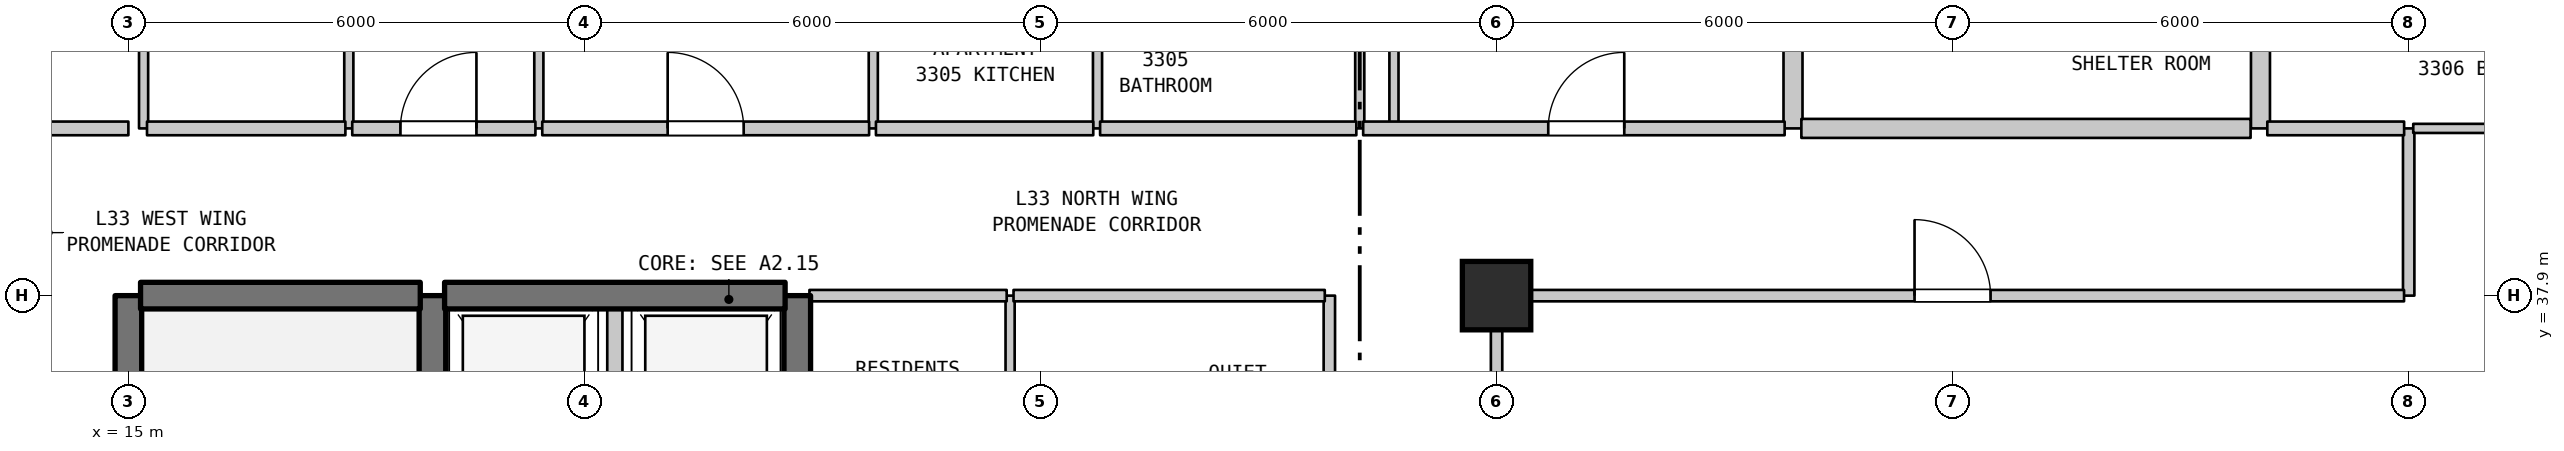
"""IFC4 building model, lengths in metres.
Left out: names, types, materials, properties, quantities, classifications, styles, units other than length and angle.
Written with IfcOpenShell. Run it as: python <this file> out.ifc"""

import sys

from ifc_helpers import new_model, si_unit, direction, frame, frame_2d, origin, origin_2d, place, context, subcontext, project, spatial, rectangle, extrude, element, fill, save


model = new_model("IFC4")
c1 = context("Model", 3, precision=1e-05, world=origin(), true_north=direction((0.0, 1.0)))
c2 = subcontext(c1, "Body", "Model", "MODEL_VIEW")
j1 = project(units=[si_unit("LENGTHUNIT", "METRE"), si_unit("PLANEANGLEUNIT", "RADIAN")], contexts=[c1])
p1 = place(None, origin())
s1 = spatial("IfcSite", under=j1, at=p1, CompositionType="ELEMENT")
p2 = place(p1, origin())
s2 = spatial("IfcBuilding", under=s1, at=p2, CompositionType="ELEMENT")
p3 = place(p2, frame((0.0, 0.0, 137.2)))
s3 = spatial("IfcBuildingStorey", under=s2, at=p3, CompositionType="ELEMENT", Elevation=137.2)
p4 = place(p3, frame((33.0, 37.9, 0.0), z_axis=(0.0, 0.0, 1.0), x_axis=(1.0, 0.0, 0.0)))
e1 = element("IfcColumn", 1, at=p4, inside=s3, PredefinedType="COLUMN", context=c2, shape_type="SweptSolid", body=[
    extrude(rectangle(XDim=0.9, YDim=0.9, at=origin_2d()), origin(), (0.0, 0.0, 1.0), 3.7),
])
p5 = place(p3, frame((15.0, 31.1, 0.0), z_axis=(0.0, 0.0, 1.0), x_axis=(0.0, 1.0, 0.0)))
e2 = element("IfcWall", 2, at=p5, inside=s3, PredefinedType="SHEAR", context=c2, shape_type="SweptSolid", body=[
    extrude(rectangle(XDim=6.8, YDim=0.35, at=frame_2d((3.4, 0.0))), origin(), (0.0, 0.0, 1.0), 3.385),
])
p6 = place(p3, frame((15.2, 40.1, 0.0), z_axis=(0.0, 0.0, 1.0), x_axis=(0.0, 1.0, 0.0)))
e3 = element("IfcWall", 3, at=p6, inside=s3, PredefinedType="PARTITIONING", context=c2, shape_type="SweptSolid", body=[
    extrude(rectangle(XDim=3.2, YDim=0.12, at=frame_2d((1.6, 0.0))), origin(), (0.0, 0.0, 1.0), 3.385),
])
p7 = place(p3, frame((17.9, 40.1, 0.0), z_axis=(0.0, 0.0, 1.0), x_axis=(0.0, 1.0, 0.0)))
e4 = element("IfcWall", 4, at=p7, inside=s3, PredefinedType="PARTITIONING", context=c2, shape_type="SweptSolid", body=[
    extrude(rectangle(XDim=3.2, YDim=0.12, at=frame_2d((1.6, 0.0))), origin(), (0.0, 0.0, 1.0), 3.385),
])
p8 = place(p7, frame((1.15, 0.0, 0.0)))
e5 = element("IfcOpeningElement", 5, at=p8, cuts=e4, PredefinedType="OPENING", context=c2, shape_type="SweptSolid", body=[
    extrude(rectangle(XDim=0.9, YDim=2.15, at=frame_2d((0.45, 1.075))), frame((0.0, 0.07, 0.0), z_axis=(0.0, -1.0, 0.0), x_axis=(1.0, 0.0, 0.0)), (0.0, 0.0, 1.0), 0.14),
])
p9 = place(p3, frame((19.0, 35.0, 0.0), z_axis=(0.0, 0.0, 1.0), x_axis=(0.0, 1.0, 0.0)))
e6 = element("IfcWall", 6, at=p9, inside=s3, PredefinedType="SHEAR", context=c2, shape_type="SweptSolid", body=[
    extrude(rectangle(XDim=2.9, YDim=0.35, at=frame_2d((1.45, 0.0))), origin(), (0.0, 0.0, 1.0), 3.385),
])
p10 = place(p3, frame((20.4, 40.1, 0.0), z_axis=(0.0, 0.0, 1.0), x_axis=(0.0, 1.0, 0.0)))
e7 = element("IfcWall", 7, at=p10, inside=s3, PredefinedType="PARTITIONING", context=c2, shape_type="SweptSolid", body=[
    extrude(rectangle(XDim=13.79, YDim=0.12, at=frame_2d((6.895, 0.0))), origin(), (0.0, 0.0, 1.0), 3.385),
])
p11 = place(p3, frame((21.4, 35.0, 0.0), z_axis=(0.0, 0.0, 1.0), x_axis=(0.0, 1.0, 0.0)))
e8 = element("IfcWall", 8, at=p11, inside=s3, PredefinedType="STANDARD", context=c2, shape_type="SweptSolid", body=[
    extrude(rectangle(XDim=2.9, YDim=0.2, at=frame_2d((1.45, 0.0))), origin(), (0.0, 0.0, 1.0), 3.385),
])
p12 = place(p3, frame((23.8, 35.0, 0.0), z_axis=(0.0, 0.0, 1.0), x_axis=(0.0, 1.0, 0.0)))
e9 = element("IfcWall", 9, at=p12, inside=s3, PredefinedType="SHEAR", context=c2, shape_type="SweptSolid", body=[
    extrude(rectangle(XDim=2.9, YDim=0.35, at=frame_2d((1.45, 0.0))), origin(), (0.0, 0.0, 1.0), 3.385),
])
p13 = place(p3, frame((24.8, 40.1, 0.0), z_axis=(0.0, 0.0, 1.0), x_axis=(0.0, 1.0, 0.0)))
e10 = element("IfcWall", 10, at=p13, inside=s3, PredefinedType="PARTITIONING", context=c2, shape_type="SweptSolid", body=[
    extrude(rectangle(XDim=2.3, YDim=0.12, at=frame_2d((1.15, 0.0))), origin(), (0.0, 0.0, 1.0), 3.385),
])
p14 = place(p3, frame((26.6, 35.0, 0.0), z_axis=(0.0, 0.0, 1.0), x_axis=(0.0, 1.0, 0.0)))
e11 = element("IfcWall", 11, at=p14, inside=s3, PredefinedType="PARTITIONING", context=c2, shape_type="SweptSolid", body=[
    extrude(rectangle(XDim=2.9, YDim=0.12, at=frame_2d((1.45, 0.0))), origin(), (0.0, 0.0, 1.0), 3.385),
])
p15 = place(p3, frame((27.75, 40.1, 0.0), z_axis=(0.0, 0.0, 1.0), x_axis=(0.0, 1.0, 0.0)))
e12 = element("IfcWall", 12, at=p15, inside=s3, PredefinedType="PARTITIONING", context=c2, shape_type="SweptSolid", body=[
    extrude(rectangle(XDim=2.3, YDim=0.12, at=frame_2d((1.15, 0.0))), origin(), (0.0, 0.0, 1.0), 3.385),
])
p16 = place(p3, frame((30.8, 35.0, 0.0), z_axis=(0.0, 0.0, 1.0), x_axis=(0.0, 1.0, 0.0)))
e13 = element("IfcWall", 13, at=p16, inside=s3, PredefinedType="STANDARD", context=c2, shape_type="SweptSolid", body=[
    extrude(rectangle(XDim=2.9, YDim=0.15, at=frame_2d((1.45, 0.0))), origin(), (0.0, 0.0, 1.0), 3.385),
])
p17 = place(p3, frame((31.2, 40.1, 0.0), z_axis=(0.0, 0.0, 1.0), x_axis=(0.0, 1.0, 0.0)))
e14 = element("IfcWall", 14, at=p17, inside=s3, PredefinedType="PARTITIONING", context=c2, shape_type="SweptSolid", body=[
    extrude(rectangle(XDim=2.3, YDim=0.12, at=frame_2d((1.15, 0.0))), origin(), (0.0, 0.0, 1.0), 3.385),
])
p18 = place(p3, frame((31.65, 40.1, 0.0), z_axis=(0.0, 0.0, 1.0), x_axis=(0.0, 1.0, 0.0)))
e15 = element("IfcWall", 15, at=p18, inside=s3, PredefinedType="PARTITIONING", context=c2, shape_type="SweptSolid", body=[
    extrude(rectangle(XDim=2.05, YDim=0.12, at=frame_2d((1.025, 0.0))), origin(), (0.0, 0.0, 1.0), 3.385),
])
p19 = place(p3, frame((33.0, 29.16, 0.0), z_axis=(0.0, 0.0, 1.0), x_axis=(0.0, 1.0, 0.0)))
e16 = element("IfcWall", 16, at=p19, inside=s3, PredefinedType="STANDARD", context=c2, shape_type="SweptSolid", body=[
    extrude(rectangle(XDim=8.74, YDim=0.15, at=frame_2d((4.37, 0.0))), origin(), (0.0, 0.0, 1.0), 2.885),
])
p20 = place(p19, frame((3.799, 0.0, 0.0)))
e17 = element("IfcOpeningElement", 17, at=p20, cuts=e16, PredefinedType="OPENING", context=c2, shape_type="SweptSolid", body=[
    extrude(rectangle(XDim=1.0, YDim=2.15, at=frame_2d((0.5, 1.075))), frame((0.0, 0.085, 0.0), z_axis=(0.0, -1.0, 0.0), x_axis=(1.0, 0.0, 0.0)), (0.0, 0.0, 1.0), 0.17),
])
for number, where, z_axis, x_axis in (
    (18, (36.9, 40.1, 0.0), (0.0, 0.0, 1.0), (0.0, 1.0, 0.0)),
    (19, (43.05, 40.1, 0.0), (0.0, 0.0, 1.0), (0.0, 1.0, 0.0)),
):
    element("IfcWall", number, at=place(p3, frame(where, z_axis=z_axis, x_axis=x_axis)), inside=s3, PredefinedType="STANDARD", context=c2, shape_type="SweptSolid", body=[
        extrude(rectangle(XDim=2.3, YDim=0.25, at=frame_2d((1.15, 0.0))), origin(), (0.0, 0.0, 1.0), 3.385),
    ])
p21 = place(p3, frame((45.0, 37.9, 0.0), z_axis=(0.0, 0.0, 1.0), x_axis=(0.0, 1.0, 0.0)))
e20 = element("IfcWall", 20, at=p21, inside=s3, PredefinedType="STANDARD", context=c2, shape_type="SweptSolid", body=[
    extrude(rectangle(XDim=2.2, YDim=0.15, at=frame_2d((1.1, 0.0))), origin(), (0.0, 0.0, 1.0), 3.385),
])
p22 = place(p3, frame((15.16, 37.9, 0.0), z_axis=(0.0, 0.0, 1.0), x_axis=(1.0, 0.0, 0.0)))
e21 = element("IfcWall", 21, at=p22, inside=s3, PredefinedType="SHEAR", context=c2, shape_type="SweptSolid", body=[
    extrude(rectangle(XDim=3.68, YDim=0.35, at=frame_2d((1.84, 0.0))), origin(), (0.0, 0.0, 1.0), 3.385),
])
p23 = place(p3, frame((19.16, 37.9, 0.0), z_axis=(0.0, 0.0, 1.0), x_axis=(1.0, 0.0, 0.0)))
e22 = element("IfcWall", 22, at=p23, inside=s3, PredefinedType="SHEAR", context=c2, shape_type="SweptSolid", body=[
    extrude(rectangle(XDim=4.48, YDim=0.35, at=frame_2d((2.24, 0.0))), origin(), (0.0, 0.0, 1.0), 3.385),
])
p24 = place(p3, frame((23.96, 37.9, 0.0), z_axis=(0.0, 0.0, 1.0), x_axis=(1.0, 0.0, 0.0)))
e23 = element("IfcWall", 23, at=p24, inside=s3, PredefinedType="STANDARD", context=c2, shape_type="SweptSolid", body=[
    extrude(rectangle(XDim=2.595, YDim=0.15, at=frame_2d((1.297, 0.0))), origin(), (0.0, 0.0, 1.0), 2.885),
])
p25 = place(p3, frame((26.645, 37.9, 0.0), z_axis=(0.0, 0.0, 1.0), x_axis=(1.0, 0.0, 0.0)))
e24 = element("IfcWall", 24, at=p25, inside=s3, PredefinedType="STANDARD", context=c2, shape_type="SweptSolid", body=[
    extrude(rectangle(XDim=4.095, YDim=0.15, at=frame_2d((2.047, 0.0))), origin(), (0.0, 0.0, 1.0), 2.885),
])
p26 = place(p3, frame((33.06, 37.9, 0.0), z_axis=(0.0, 0.0, 1.0), x_axis=(1.0, 0.0, 0.0)))
e25 = element("IfcWall", 25, at=p26, inside=s3, PredefinedType="STANDARD", context=c2, shape_type="SweptSolid", body=[
    extrude(rectangle(XDim=11.879, YDim=0.15, at=frame_2d((5.939, 0.0))), origin(), (0.0, 0.0, 1.0), 3.385),
])
p27 = place(p26, frame((5.439, 0.0, 0.0)))
e26 = element("IfcOpeningElement", 26, at=p27, cuts=e25, PredefinedType="OPENING", context=c2, shape_type="SweptSolid", body=[
    extrude(rectangle(XDim=1.0, YDim=2.15, at=frame_2d((0.5, 1.075))), frame((0.0, 0.085, 0.0), z_axis=(0.0, -1.0, 0.0), x_axis=(1.0, 0.0, 0.0)), (0.0, 0.0, 1.0), 0.17),
])
p28 = place(p3, frame((12.875, 40.1, 0.0), z_axis=(0.0, 0.0, 1.0), x_axis=(1.0, 0.0, 0.0)))
e27 = element("IfcWall", 27, at=p28, inside=s3, PredefinedType="STANDARD", context=c2, shape_type="SweptSolid", body=[
    extrude(rectangle(XDim=2.125, YDim=0.18, at=frame_2d((1.062, 0.0))), origin(), (0.0, 0.0, 1.0), 3.385),
])
p29 = place(p3, frame((15.245, 40.1, 0.0), z_axis=(0.0, 0.0, 1.0), x_axis=(1.0, 0.0, 0.0)))
e28 = element("IfcWall", 28, at=p29, inside=s3, PredefinedType="STANDARD", context=c2, shape_type="SweptSolid", body=[
    extrude(rectangle(XDim=2.61, YDim=0.18, at=frame_2d((1.305, 0.0))), origin(), (0.0, 0.0, 1.0), 3.385),
])
p30 = place(p3, frame((17.945, 40.1, 0.0), z_axis=(0.0, 0.0, 1.0), x_axis=(1.0, 0.0, 0.0)))
e29 = element("IfcWall", 29, at=p30, inside=s3, PredefinedType="STANDARD", context=c2, shape_type="SweptSolid", body=[
    extrude(rectangle(XDim=2.41, YDim=0.18, at=frame_2d((1.205, 0.0))), origin(), (0.0, 0.0, 1.0), 3.385),
])
p31 = place(p30, frame((0.634, 0.0, 0.0)))
e30 = element("IfcOpeningElement", 30, at=p31, cuts=e29, PredefinedType="OPENING", context=c2, shape_type="SweptSolid", body=[
    extrude(rectangle(XDim=1.0, YDim=2.15, at=frame_2d((0.5, 1.075))), frame((0.0, 0.1, 0.0), z_axis=(0.0, -1.0, 0.0), x_axis=(1.0, 0.0, 0.0)), (0.0, 0.0, 1.0), 0.2),
])
p32 = place(p3, frame((20.445, 40.1, 0.0), z_axis=(0.0, 0.0, 1.0), x_axis=(1.0, 0.0, 0.0)))
e31 = element("IfcWall", 31, at=p32, inside=s3, PredefinedType="STANDARD", context=c2, shape_type="SweptSolid", body=[
    extrude(rectangle(XDim=4.3, YDim=0.18, at=frame_2d((2.15, 0.0))), origin(), (0.0, 0.0, 1.0), 3.385),
])
p33 = place(p32, frame((1.65, 0.0, 0.0)))
e32 = element("IfcOpeningElement", 32, at=p33, cuts=e31, PredefinedType="OPENING", context=c2, shape_type="SweptSolid", body=[
    extrude(rectangle(XDim=1.0, YDim=2.15, at=frame_2d((0.5, 1.075))), frame((0.0, 0.1, 0.0), z_axis=(0.0, -1.0, 0.0), x_axis=(1.0, 0.0, 0.0)), (0.0, 0.0, 1.0), 0.2),
])
p34 = place(p3, frame((24.835, 40.1, 0.0), z_axis=(0.0, 0.0, 1.0), x_axis=(1.0, 0.0, 0.0)))
e33 = element("IfcWall", 33, at=p34, inside=s3, PredefinedType="STANDARD", context=c2, shape_type="SweptSolid", body=[
    extrude(rectangle(XDim=2.859, YDim=0.18, at=frame_2d((1.43, 0.0))), origin(), (0.0, 0.0, 1.0), 3.385),
])
p35 = place(p3, frame((27.784, 40.1, 0.0), z_axis=(0.0, 0.0, 1.0), x_axis=(1.0, 0.0, 0.0)))
e34 = element("IfcWall", 34, at=p35, inside=s3, PredefinedType="STANDARD", context=c2, shape_type="SweptSolid", body=[
    extrude(rectangle(XDim=3.371, YDim=0.18, at=frame_2d((1.686, 0.0))), origin(), (0.0, 0.0, 1.0), 3.385),
])
p36 = place(p3, frame((31.245, 40.1, 0.0), z_axis=(0.0, 0.0, 1.0), x_axis=(1.0, 0.0, 0.0)))
e35 = element("IfcWall", 35, at=p36, inside=s3, PredefinedType="STANDARD", context=c2, shape_type="SweptSolid", body=[
    extrude(rectangle(XDim=5.545, YDim=0.18, at=frame_2d((2.772, 0.0))), origin(), (0.0, 0.0, 1.0), 3.385),
])
p37 = place(p36, frame((2.435, 0.0, 0.0)))
e36 = element("IfcOpeningElement", 36, at=p37, cuts=e35, PredefinedType="OPENING", context=c2, shape_type="SweptSolid", body=[
    extrude(rectangle(XDim=1.0, YDim=2.15, at=frame_2d((0.5, 1.075))), frame((0.0, 0.1, 0.0), z_axis=(0.0, -1.0, 0.0), x_axis=(1.0, 0.0, 0.0)), (0.0, 0.0, 1.0), 0.2),
])
p38 = place(p3, frame((37.01, 40.1, 0.0), z_axis=(0.0, 0.0, 1.0), x_axis=(1.0, 0.0, 0.0)))
e37 = element("IfcWall", 37, at=p38, inside=s3, PredefinedType="STANDARD", context=c2, shape_type="SweptSolid", body=[
    extrude(rectangle(XDim=5.91, YDim=0.25, at=frame_2d((2.955, 0.0))), origin(), (0.0, 0.0, 1.0), 3.385),
])
p39 = place(p3, frame((43.14, 40.1, 0.0), z_axis=(0.0, 0.0, 1.0), x_axis=(1.0, 0.0, 0.0)))
e38 = element("IfcWall", 38, at=p39, inside=s3, PredefinedType="STANDARD", context=c2, shape_type="SweptSolid", body=[
    extrude(rectangle(XDim=1.8, YDim=0.18, at=frame_2d((0.9, 0.0))), origin(), (0.0, 0.0, 1.0), 3.385),
])
p40 = place(p3, frame((45.06, 40.1, 0.0), z_axis=(0.0, 0.0, 1.0), x_axis=(1.0, 0.0, 0.0)))
e39 = element("IfcWall", 39, at=p40, inside=s3, PredefinedType="PARTITIONING", context=c2, shape_type="SweptSolid", body=[
    extrude(rectangle(XDim=2.225, YDim=0.12, at=frame_2d((1.112, 0.0))), origin(), (0.0, 0.0, 1.0), 3.385),
])
p41 = place(p27, origin())
e40 = element("IfcDoor", 40, at=p41, inside=s3, OperationType="SINGLE_SWING_LEFT", PredefinedType="DOOR", context=c2, shape_type="SweptSolid", body=[
    extrude(rectangle(XDim=1.0, YDim=2.15, at=frame_2d((0.5, 1.075))), frame((0.0, 0.025, 0.0), z_axis=(0.0, -1.0, 0.0), x_axis=(1.0, 0.0, 0.0)), (0.0, 0.0, 1.0), 0.05),
])
fill(e26, e40)
p42 = place(p31, origin())
e41 = element("IfcDoor", 41, at=p42, inside=s3, OperationType="SINGLE_SWING_RIGHT", PredefinedType="DOOR", context=c2, shape_type="SweptSolid", body=[
    extrude(rectangle(XDim=1.0, YDim=2.15, at=frame_2d((0.5, 1.075))), frame((0.0, 0.025, 0.0), z_axis=(0.0, -1.0, 0.0), x_axis=(1.0, 0.0, 0.0)), (0.0, 0.0, 1.0), 0.05),
])
fill(e30, e41)
p43 = place(p33, origin())
e42 = element("IfcDoor", 42, at=p43, inside=s3, OperationType="SINGLE_SWING_LEFT", PredefinedType="DOOR", context=c2, shape_type="SweptSolid", body=[
    extrude(rectangle(XDim=1.0, YDim=2.15, at=frame_2d((0.5, 1.075))), frame((0.0, 0.025, 0.0), z_axis=(0.0, -1.0, 0.0), x_axis=(1.0, 0.0, 0.0)), (0.0, 0.0, 1.0), 0.05),
])
fill(e32, e42)
p44 = place(p37, origin())
e43 = element("IfcDoor", 43, at=p44, inside=s3, OperationType="SINGLE_SWING_RIGHT", PredefinedType="DOOR", context=c2, shape_type="SweptSolid", body=[
    extrude(rectangle(XDim=1.0, YDim=2.15, at=frame_2d((0.5, 1.075))), frame((0.0, 0.025, 0.0), z_axis=(0.0, -1.0, 0.0), x_axis=(1.0, 0.0, 0.0)), (0.0, 0.0, 1.0), 0.05),
])
fill(e36, e43)
save(model, sys.argv[1])
